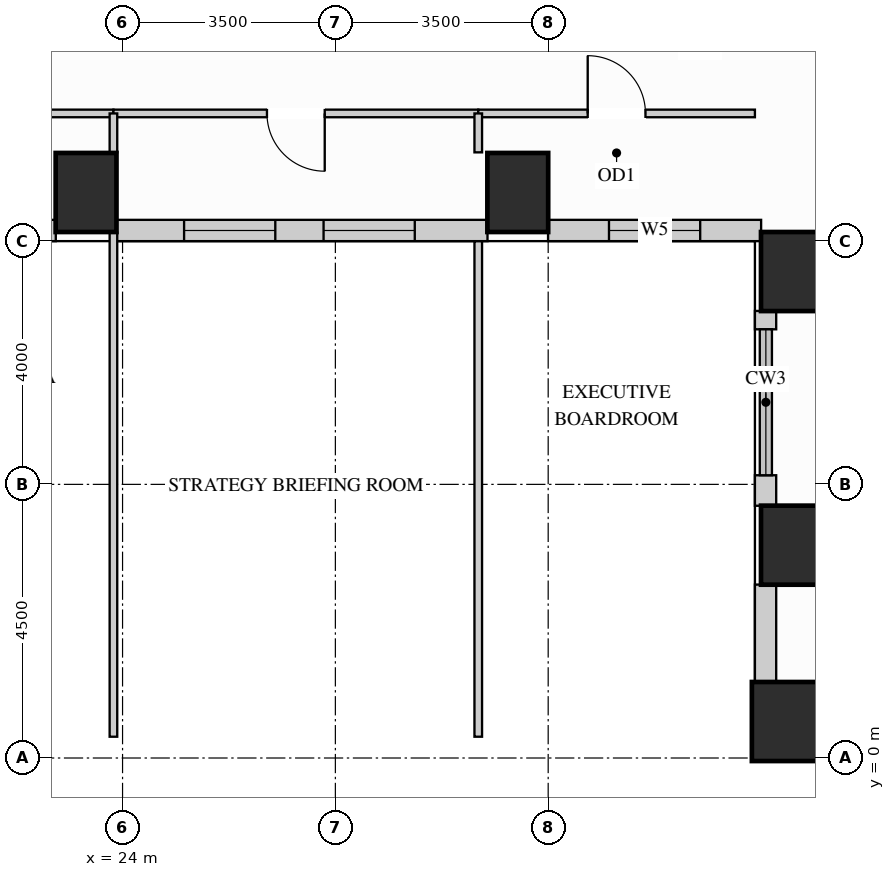
"""IFC4 building model, lengths in metres.
Left out: names, types, materials, properties, quantities, classifications, styles, units other than length and angle.
Written with IfcOpenShell. Run it as: python <this file> out.ifc"""

import sys

from ifc_helpers import new_model, si_unit, direction, frame, frame_2d, origin, origin_2d, place, context, subcontext, project, spatial, rectangle, extrude, source, transform, mapped, element, fill, save


model = new_model("IFC4")
c1 = context("Model", 3, precision=1e-05, world=origin(), true_north=direction((0.0, 1.0)))
c2 = subcontext(c1, "Body", "Model", "MODEL_VIEW")
j1 = project(units=[si_unit("LENGTHUNIT", "METRE"), si_unit("PLANEANGLEUNIT", "RADIAN")], contexts=[c1])
p1 = place(None, origin())
s1 = spatial("IfcSite", under=j1, at=p1, CompositionType="ELEMENT")
p2 = place(p1, origin())
s2 = spatial("IfcBuilding", under=s1, at=p2, CompositionType="ELEMENT")
p3 = place(p2, frame((0.0, 0.0, 29.7)))
s3 = spatial("IfcBuildingStorey", under=s2, at=p3, CompositionType="ELEMENT", Elevation=29.7)
m1 = source(origin(), c2, "Body", "SweptSolid", [
    extrude(rectangle(XDim=1.0, YDim=1.3, at=origin_2d()), origin(), (0.0, 0.0, 1.0), 3.38),
])
for number, where, z_axis, x_axis in (
    (1, (35.0, 3.5, 0.0), (0.0, 0.0, 1.0), (1.0, 0.0, 0.0)),
    (2, (35.0, 8.0, 0.0), (0.0, 0.0, 1.0), (1.0, 0.0, 0.0)),
    (3, (23.4, 9.3, 0.0), (0.0, 0.0, 1.0), (1.0, 0.0, 0.0)),
    (4, (30.5, 9.3, 0.0), (0.0, 0.0, 1.0), (1.0, 0.0, 0.0)),
):
    element("IfcColumn", number, at=place(p3, frame(where, z_axis=z_axis, x_axis=x_axis)), inside=s3, PredefinedType="COLUMN", context=c2, shape_type="MappedRepresentation", body=[
        mapped(m1, transform((0.0, 0.0, 0.0), x_axis=(1.0, 0.0, 0.0), y_axis=(0.0, 1.0, 0.0), z_axis=(0.0, 0.0, 1.0))),
    ])
m2 = source(origin(), c2, "Body", "SweptSolid", [
    extrude(rectangle(XDim=1.3, YDim=1.3, at=origin_2d()), origin(), (0.0, 0.0, 1.0), 3.38),
])
p4 = place(p3, frame((35.0, 0.6, 0.0), z_axis=(0.0, 0.0, 1.0), x_axis=(1.0, 0.0, 0.0)))
e5 = element("IfcColumn", 5, at=p4, inside=s3, PredefinedType="COLUMN", context=c2, shape_type="MappedRepresentation", body=[
    mapped(m2, transform((0.0, 0.0, 0.0), x_axis=(1.0, 0.0, 0.0), y_axis=(0.0, 1.0, 0.0), z_axis=(0.0, 0.0, 1.0))),
])
p5 = place(p3, frame((19.498, 8.675, 0.0), z_axis=(0.0, 0.0, 1.0), x_axis=(1.0, 0.0, 0.0)))
e6 = element("IfcWall", 6, at=p5, inside=s3, PredefinedType="SOLIDWALL", context=c2, shape_type="SweptSolid", body=[
    extrude(rectangle(XDim=3.404, YDim=0.35, at=frame_2d((1.702, 0.0))), origin(), (0.0, 0.0, 1.0), 3.365),
])
p6 = place(p5, frame((0.952, 0.0, 0.78)))
e7 = element("IfcOpeningElement", 7, at=p6, cuts=e6, PredefinedType="OPENING", context=c2, shape_type="SweptSolid", body=[
    extrude(rectangle(XDim=1.5, YDim=2.0, at=frame_2d((0.75, 1.0))), frame((0.0, 0.185, 0.0), z_axis=(0.0, -1.0, 0.0), x_axis=(1.0, 0.0, 0.0)), (0.0, 0.0, 1.0), 0.37),
])
p7 = place(p3, frame((23.898, 8.675, 0.0), z_axis=(0.0, 0.0, 1.0), x_axis=(1.0, 0.0, 0.0)))
e8 = element("IfcWall", 8, at=p7, inside=s3, PredefinedType="SOLIDWALL", context=c2, shape_type="SweptSolid", body=[
    extrude(rectangle(XDim=6.104, YDim=0.35, at=frame_2d((3.052, 0.0))), origin(), (0.0, 0.0, 1.0), 3.365),
])
p8 = place(p7, frame((1.114, 0.0, 0.78)))
e9 = element("IfcOpeningElement", 9, at=p8, cuts=e8, PredefinedType="OPENING", context=c2, shape_type="SweptSolid", body=[
    extrude(rectangle(XDim=1.5, YDim=2.0, at=frame_2d((0.75, 1.0))), frame((0.0, 0.185, 0.0), z_axis=(0.0, -1.0, 0.0), x_axis=(1.0, 0.0, 0.0)), (0.0, 0.0, 1.0), 0.37),
])
p9 = place(p7, frame((3.408, 0.0, 0.78)))
e10 = element("IfcOpeningElement", 10, at=p9, cuts=e8, PredefinedType="OPENING", context=c2, shape_type="SweptSolid", body=[
    extrude(rectangle(XDim=1.5, YDim=2.0, at=frame_2d((0.75, 1.0))), frame((0.0, 0.185, 0.0), z_axis=(0.0, -1.0, 0.0), x_axis=(1.0, 0.0, 0.0)), (0.0, 0.0, 1.0), 0.37),
])
p10 = place(p3, frame((30.998, 8.675, 0.0), z_axis=(0.0, 0.0, 1.0), x_axis=(1.0, 0.0, 0.0)))
e11 = element("IfcWall", 11, at=p10, inside=s3, PredefinedType="SOLIDWALL", context=c2, shape_type="SweptSolid", body=[
    extrude(rectangle(XDim=3.504, YDim=0.35, at=frame_2d((1.752, 0.0))), origin(), (0.0, 0.0, 1.0), 3.365),
])
p11 = place(p10, frame((1.002, 0.0, 0.78)))
e12 = element("IfcOpeningElement", 12, at=p11, cuts=e11, PredefinedType="OPENING", context=c2, shape_type="SweptSolid", body=[
    extrude(rectangle(XDim=1.5, YDim=2.0, at=frame_2d((0.75, 1.0))), frame((0.0, 0.185, 0.0), z_axis=(0.0, -1.0, 0.0), x_axis=(1.0, 0.0, 0.0)), (0.0, 0.0, 1.0), 0.37),
])
m3 = source(origin(), c2, "Body", "SweptSolid", [
    extrude(rectangle(XDim=0.302, YDim=0.35, at=frame_2d((0.151, 0.0))), origin(), (0.0, 0.0, 1.0), 2.51),
])
p12 = place(p3, frame((34.575, 7.352, 0.0), z_axis=(0.0, 0.0, 1.0), x_axis=(0.0, -1.0, 0.0)))
e13 = element("IfcWall", 13, at=p12, inside=s3, PredefinedType="SOLIDWALL", context=c2, shape_type="MappedRepresentation", body=[
    mapped(m3, transform((0.0, 0.0, 0.0), x_axis=(1.0, 0.0, 0.0), y_axis=(0.0, 1.0, 0.0), z_axis=(0.0, 0.0, 1.0))),
])
m4 = source(origin(), c2, "Body", "SweptSolid", [
    extrude(rectangle(XDim=0.502, YDim=0.35, at=frame_2d((0.251, 0.0))), origin(), (0.0, 0.0, 1.0), 2.51),
])
p13 = place(p3, frame((34.575, 4.65, 0.0), z_axis=(0.0, 0.0, 1.0), x_axis=(0.0, -1.0, 0.0)))
e14 = element("IfcWall", 14, at=p13, inside=s3, PredefinedType="SOLIDWALL", context=c2, shape_type="MappedRepresentation", body=[
    mapped(m4, transform((0.0, 0.0, 0.0), x_axis=(1.0, 0.0, 0.0), y_axis=(0.0, 1.0, 0.0), z_axis=(0.0, 0.0, 1.0))),
])
m5 = source(origin(), c2, "Body", "SweptSolid", [
    extrude(rectangle(XDim=1.604, YDim=0.35, at=frame_2d((0.802, 0.0))), origin(), (0.0, 0.0, 1.0), 2.51),
])
p14 = place(p3, frame((34.575, 2.852, 0.0), z_axis=(0.0, 0.0, 1.0), x_axis=(0.0, -1.0, 0.0)))
e15 = element("IfcWall", 15, at=p14, inside=s3, PredefinedType="SOLIDWALL", context=c2, shape_type="MappedRepresentation", body=[
    mapped(m5, transform((0.0, 0.0, 0.0), x_axis=(1.0, 0.0, 0.0), y_axis=(0.0, 1.0, 0.0), z_axis=(0.0, 0.0, 1.0))),
])
p15 = place(p3, frame((19.5, 10.6, 0.0), z_axis=(0.0, 0.0, 1.0), x_axis=(1.0, 0.0, 0.0)))
e16 = element("IfcWall", 16, at=p15, inside=s3, PredefinedType="PARTITIONING", context=c2, shape_type="SweptSolid", body=[
    extrude(rectangle(XDim=4.35, YDim=0.125, at=frame_2d((2.175, 0.0))), origin(), (0.0, 0.0, 1.0), 3.365),
])
p16 = place(p15, frame((1.7, 0.0, 0.0)))
e17 = element("IfcOpeningElement", 17, at=p16, cuts=e16, PredefinedType="OPENING", context=c2, shape_type="SweptSolid", body=[
    extrude(rectangle(XDim=0.95, YDim=2.15, at=frame_2d((0.475, 1.075))), frame((0.0, 0.073, 0.0), z_axis=(0.0, -1.0, 0.0), x_axis=(1.0, 0.0, 0.0)), (0.0, 0.0, 1.0), 0.145),
])
p17 = place(p3, frame((23.85, 10.6, 0.0), z_axis=(0.0, 0.0, 1.0), x_axis=(1.0, 0.0, 0.0)))
e18 = element("IfcWall", 18, at=p17, inside=s3, PredefinedType="PARTITIONING", context=c2, shape_type="SweptSolid", body=[
    extrude(rectangle(XDim=6.0, YDim=0.125, at=frame_2d((3.0, 0.0))), origin(), (0.0, 0.0, 1.0), 3.365),
])
p18 = place(p17, frame((2.525, 0.0, 0.0)))
e19 = element("IfcOpeningElement", 19, at=p18, cuts=e18, PredefinedType="OPENING", context=c2, shape_type="SweptSolid", body=[
    extrude(rectangle(XDim=0.95, YDim=2.15, at=frame_2d((0.475, 1.075))), frame((0.0, 0.073, 0.0), z_axis=(0.0, -1.0, 0.0), x_axis=(1.0, 0.0, 0.0)), (0.0, 0.0, 1.0), 0.145),
])
p19 = place(p3, frame((29.85, 10.6, 0.0), z_axis=(0.0, 0.0, 1.0), x_axis=(1.0, 0.0, 0.0)))
e20 = element("IfcWall", 20, at=p19, inside=s3, PredefinedType="PARTITIONING", context=c2, shape_type="SweptSolid", body=[
    extrude(rectangle(XDim=4.55, YDim=0.125, at=frame_2d((2.275, 0.0))), origin(), (0.0, 0.0, 1.0), 3.365),
])
p20 = place(p19, frame((1.8, 0.0, 0.0)))
e21 = element("IfcOpeningElement", 21, at=p20, cuts=e20, PredefinedType="OPENING", context=c2, shape_type="SweptSolid", body=[
    extrude(rectangle(XDim=0.95, YDim=2.15, at=frame_2d((0.475, 1.075))), frame((0.0, 0.073, 0.0), z_axis=(0.0, -1.0, 0.0), x_axis=(1.0, 0.0, 0.0)), (0.0, 0.0, 1.0), 0.145),
])
m6 = source(origin(), c2, "Body", "SweptSolid", [
    extrude(rectangle(XDim=8.29, YDim=0.125, at=frame_2d((4.145, 0.0))), origin(), (0.0, 0.0, 1.0), 3.365),
])
p21 = place(p3, frame((23.85, 0.35, 0.0), z_axis=(0.0, 0.0, 1.0), x_axis=(0.0, 1.0, 0.0)))
e22 = element("IfcWall", 22, at=p21, inside=s3, PredefinedType="PARTITIONING", context=c2, shape_type="MappedRepresentation", body=[
    mapped(m6, transform((0.0, 0.0, 0.0), x_axis=(1.0, 0.0, 0.0), y_axis=(0.0, 1.0, 0.0), z_axis=(0.0, 0.0, 1.0))),
])
m7 = source(origin(), c2, "Body", "SweptSolid", [
    extrude(rectangle(XDim=0.64, YDim=0.125, at=frame_2d((0.32, 0.0))), origin(), (0.0, 0.0, 1.0), 3.365),
])
p22 = place(p3, frame((23.85, 9.96, 0.0), z_axis=(0.0, 0.0, 1.0), x_axis=(0.0, 1.0, 0.0)))
e23 = element("IfcWall", 23, at=p22, inside=s3, PredefinedType="PARTITIONING", context=c2, shape_type="MappedRepresentation", body=[
    mapped(m7, transform((0.0, 0.0, 0.0), x_axis=(1.0, 0.0, 0.0), y_axis=(0.0, 1.0, 0.0), z_axis=(0.0, 0.0, 1.0))),
])
m8 = source(origin(), c2, "Body", "SweptSolid", [
    extrude(rectangle(XDim=8.148, YDim=0.125, at=frame_2d((4.074, 0.0))), origin(), (0.0, 0.0, 1.0), 3.365),
])
p23 = place(p3, frame((29.85, 0.35, 0.0), z_axis=(0.0, 0.0, 1.0), x_axis=(0.0, 1.0, 0.0)))
e24 = element("IfcWall", 24, at=p23, inside=s3, PredefinedType="PARTITIONING", context=c2, shape_type="MappedRepresentation", body=[
    mapped(m8, transform((0.0, 0.0, 0.0), x_axis=(1.0, 0.0, 0.0), y_axis=(0.0, 1.0, 0.0), z_axis=(0.0, 0.0, 1.0))),
])
p24 = place(p3, frame((29.85, 9.96, 0.0), z_axis=(0.0, 0.0, 1.0), x_axis=(0.0, 1.0, 0.0)))
e25 = element("IfcWall", 25, at=p24, inside=s3, PredefinedType="PARTITIONING", context=c2, shape_type="MappedRepresentation", body=[
    mapped(m7, transform((0.0, 0.0, 0.0), x_axis=(1.0, 0.0, 0.0), y_axis=(0.0, 1.0, 0.0), z_axis=(0.0, 0.0, 1.0))),
])
m9 = source(origin(), c2, "Body", "SweptSolid", [
    extrude(rectangle(XDim=0.95, YDim=2.15, at=frame_2d((0.475, 1.075))), frame((0.0, 0.025, 0.0), z_axis=(0.0, -1.0, 0.0), x_axis=(1.0, 0.0, 0.0)), (0.0, 0.0, 1.0), 0.05),
])
p25 = place(p18, origin())
e26 = element("IfcDoor", 26, at=p25, inside=s3, OperationType="SINGLE_SWING_RIGHT", PredefinedType="DOOR", context=c2, shape_type="MappedRepresentation", body=[
    mapped(m9, transform((0.0, 0.0, 0.0), x_axis=(1.0, 0.0, 0.0), y_axis=(0.0, 1.0, 0.0), z_axis=(0.0, 0.0, 1.0))),
])
fill(e19, e26)
p26 = place(p20, origin())
e27 = element("IfcDoor", 27, at=p26, inside=s3, OperationType="SINGLE_SWING_LEFT", PredefinedType="DOOR", context=c2, shape_type="MappedRepresentation", body=[
    mapped(m9, transform((0.0, 0.0, 0.0), x_axis=(1.0, 0.0, 0.0), y_axis=(0.0, 1.0, 0.0), z_axis=(0.0, 0.0, 1.0))),
])
fill(e21, e27)
m10 = source(origin(), c2, "Body", "SweptSolid", [
    extrude(rectangle(XDim=1.5, YDim=2.0, at=frame_2d((0.75, 1.0))), frame((0.0, 0.03, 0.0), z_axis=(0.0, -1.0, 0.0), x_axis=(1.0, 0.0, 0.0)), (0.0, 0.0, 1.0), 0.06),
])
p27 = place(p8, origin())
e28 = element("IfcWindow", 28, at=p27, inside=s3, PartitioningType="SINGLE_PANEL", PredefinedType="WINDOW", context=c2, shape_type="MappedRepresentation", body=[
    mapped(m10, transform((0.0, 0.0, 0.0), x_axis=(1.0, 0.0, 0.0), y_axis=(0.0, 1.0, 0.0), z_axis=(0.0, 0.0, 1.0))),
])
fill(e9, e28)
p28 = place(p9, origin())
e29 = element("IfcWindow", 29, at=p28, inside=s3, PartitioningType="SINGLE_PANEL", PredefinedType="WINDOW", context=c2, shape_type="MappedRepresentation", body=[
    mapped(m10, transform((0.0, 0.0, 0.0), x_axis=(1.0, 0.0, 0.0), y_axis=(0.0, 1.0, 0.0), z_axis=(0.0, 0.0, 1.0))),
])
fill(e10, e29)
p29 = place(p11, origin())
e30 = element("IfcWindow", 30, at=p29, inside=s3, PartitioningType="SINGLE_PANEL", PredefinedType="WINDOW", context=c2, shape_type="MappedRepresentation", body=[
    mapped(m10, transform((0.0, 0.0, 0.0), x_axis=(1.0, 0.0, 0.0), y_axis=(0.0, 1.0, 0.0), z_axis=(0.0, 0.0, 1.0))),
])
fill(e12, e30)
save(model, sys.argv[1])
